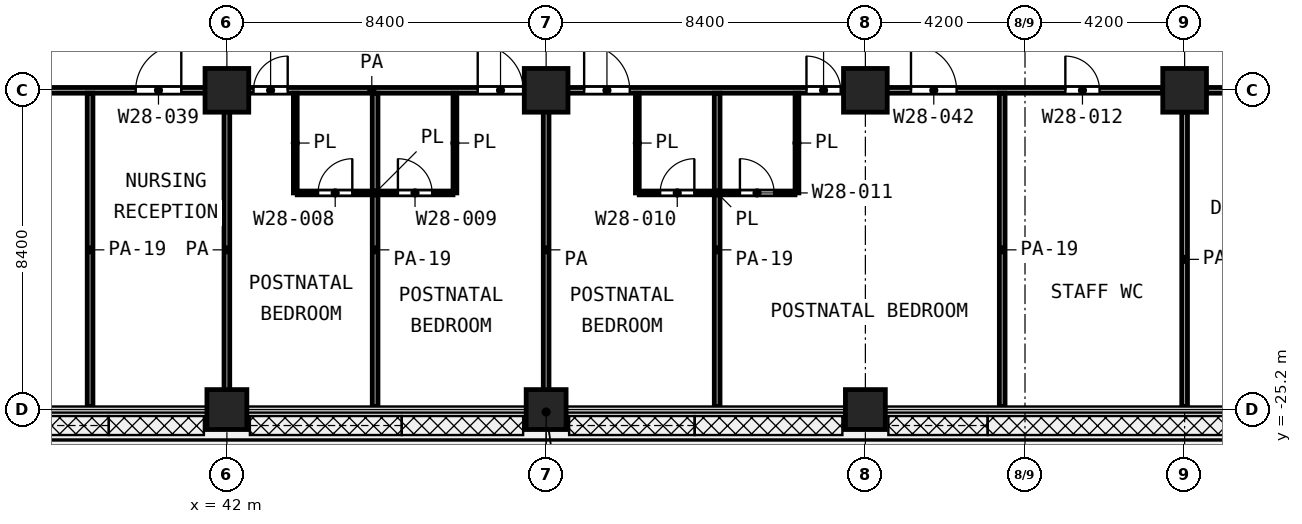
"""IFC4 building model, lengths in metres.
Left out: names, types, materials, properties, quantities, classifications, styles, units other than length and angle.
Written with IfcOpenShell. Run it as: python <this file> out.ifc"""

import sys

from ifc_helpers import new_model, si_unit, direction, frame, frame_2d, origin, origin_2d, place, context, subcontext, project, spatial, rectangle, extrude, element, fill, save


model = new_model("IFC4")
c1 = context("Model", 3, precision=1e-05, world=origin(), true_north=direction((0.0, 1.0)))
c2 = subcontext(c1, "Body", "Model", "MODEL_VIEW")
j1 = project(units=[si_unit("LENGTHUNIT", "METRE"), si_unit("PLANEANGLEUNIT", "RADIAN")], contexts=[c1])
p1 = place(None, origin())
s1 = spatial("IfcSite", under=j1, at=p1, CompositionType="ELEMENT")
p2 = place(p1, origin())
s2 = spatial("IfcBuilding", under=s1, at=p2, CompositionType="ELEMENT")
p3 = place(p2, frame((0.0, 0.0, 124.0)))
s3 = spatial("IfcBuildingStorey", under=s2, at=p3, CompositionType="ELEMENT", Elevation=124.0)
for number, where, z_axis, x_axis in (
    (1, (42.0, -16.8, 0.0), (0.0, 0.0, 1.0), (1.0, 0.0, 0.0)),
    (2, (50.4, -16.8, 0.0), (0.0, 0.0, 1.0), (1.0, 0.0, 0.0)),
    (3, (58.8, -16.8, 0.0), (0.0, 0.0, 1.0), (1.0, 0.0, 0.0)),
    (4, (67.2, -16.8, 0.0), (0.0, 0.0, 1.0), (1.0, 0.0, 0.0)),
):
    element("IfcColumn", number, at=place(p3, frame(where, z_axis=z_axis, x_axis=x_axis)), inside=s3, PredefinedType="COLUMN", context=c2, shape_type="SweptSolid", body=[
        extrude(rectangle(XDim=1.15, YDim=1.15, at=origin_2d()), origin(), (0.0, 0.0, 1.0), 4.2),
    ])
for number, where, z_axis, x_axis in (
    (5, (42.0, -25.2, 0.0), (0.0, 0.0, 1.0), (1.0, 0.0, 0.0)),
    (6, (50.4, -25.2, 0.0), (0.0, 0.0, 1.0), (1.0, 0.0, 0.0)),
    (7, (58.8, -25.2, 0.0), (0.0, 0.0, 1.0), (1.0, 0.0, 0.0)),
):
    element("IfcColumn", number, at=place(p3, frame(where, z_axis=z_axis, x_axis=x_axis)), inside=s3, PredefinedType="COLUMN", context=c2, shape_type="SweptSolid", body=[
        extrude(rectangle(XDim=1.05, YDim=1.05, at=origin_2d()), origin(), (0.0, 0.0, 1.0), 4.2),
    ])
p4 = place(p3, frame((43.85, -19.5, 0.0), z_axis=(0.0, 0.0, 1.0), x_axis=(1.0, 0.0, 0.0)))
e8 = element("IfcWall", 8, at=p4, inside=s3, PredefinedType="PARTITIONING", context=c2, shape_type="SweptSolid", body=[
    extrude(rectangle(XDim=4.1, YDim=0.1, at=frame_2d((2.05, 0.0))), origin(), (0.0, 0.0, 1.0), 3.6),
])
p5 = place(p4, frame((0.55, 0.0, 0.0)))
e9 = element("IfcOpeningElement", 9, at=p5, cuts=e8, PredefinedType="OPENING", context=c2, shape_type="SweptSolid", body=[
    extrude(rectangle(XDim=0.9, YDim=2.1, at=frame_2d((0.45, 1.05))), frame((0.0, 0.06, 0.0), z_axis=(0.0, -1.0, 0.0), x_axis=(1.0, 0.0, 0.0)), (0.0, 0.0, 1.0), 0.12),
])
p6 = place(p4, frame((2.65, 0.0, 0.0)))
e10 = element("IfcOpeningElement", 10, at=p6, cuts=e8, PredefinedType="OPENING", context=c2, shape_type="SweptSolid", body=[
    extrude(rectangle(XDim=0.9, YDim=2.1, at=frame_2d((0.45, 1.05))), frame((0.0, 0.06, 0.0), z_axis=(0.0, -1.0, 0.0), x_axis=(1.0, 0.0, 0.0)), (0.0, 0.0, 1.0), 0.12),
])
p7 = place(p3, frame((52.85, -19.5, 0.0), z_axis=(0.0, 0.0, 1.0), x_axis=(1.0, 0.0, 0.0)))
e11 = element("IfcWall", 11, at=p7, inside=s3, PredefinedType="PARTITIONING", context=c2, shape_type="SweptSolid", body=[
    extrude(rectangle(XDim=4.098, YDim=0.1, at=frame_2d((2.049, 0.0))), origin(), (0.0, 0.0, 1.0), 3.6),
])
p8 = place(p7, frame((0.55, 0.0, 0.0)))
e12 = element("IfcOpeningElement", 12, at=p8, cuts=e11, PredefinedType="OPENING", context=c2, shape_type="SweptSolid", body=[
    extrude(rectangle(XDim=0.9, YDim=2.1, at=frame_2d((0.45, 1.05))), frame((0.0, 0.06, 0.0), z_axis=(0.0, -1.0, 0.0), x_axis=(1.0, 0.0, 0.0)), (0.0, 0.0, 1.0), 0.12),
])
p9 = place(p7, frame((2.649, 0.0, 0.0)))
e13 = element("IfcOpeningElement", 13, at=p9, cuts=e11, PredefinedType="OPENING", context=c2, shape_type="SweptSolid", body=[
    extrude(rectangle(XDim=0.9, YDim=2.1, at=frame_2d((0.45, 1.05))), frame((0.0, 0.06, 0.0), z_axis=(0.0, -1.0, 0.0), x_axis=(1.0, 0.0, 0.0)), (0.0, 0.0, 1.0), 0.12),
])
for number, where, z_axis, x_axis in (
    (14, (43.8, -19.5, 0.0), (0.0, 0.0, 1.0), (0.0, 1.0, 0.0)),
    (15, (48.0, -19.5, 0.0), (0.0, 0.0, 1.0), (0.0, 1.0, 0.0)),
    (16, (52.8, -19.5, 0.0), (0.0, 0.0, 1.0), (0.0, 1.0, 0.0)),
):
    element("IfcWall", number, at=place(p3, frame(where, z_axis=z_axis, x_axis=x_axis)), inside=s3, PredefinedType="PARTITIONING", context=c2, shape_type="SweptSolid", body=[
        extrude(rectangle(XDim=2.625, YDim=0.1, at=frame_2d((1.312, 0.0))), origin(), (0.0, 0.0, 1.0), 3.6),
    ])
p10 = place(p3, frame((57.0, -19.499, 0.0), z_axis=(0.0, 0.0, 1.0), x_axis=(0.0, 1.0, 0.0)))
e17 = element("IfcWall", 17, at=p10, inside=s3, PredefinedType="PARTITIONING", context=c2, shape_type="SweptSolid", body=[
    extrude(rectangle(XDim=2.624, YDim=0.1, at=frame_2d((1.312, 0.0))), origin(), (0.0, 0.0, 1.0), 3.6),
])
p11 = place(p3, frame((25.0, -16.8, 0.0), z_axis=(0.0, 0.0, 1.0), x_axis=(1.0, 0.0, 0.0)))
e18 = element("IfcWall", 18, at=p11, inside=s3, PredefinedType="PARTITIONING", context=c2, shape_type="SweptSolid", body=[
    extrude(rectangle(XDim=41.625, YDim=0.15, at=frame_2d((20.812, 0.0))), origin(), (0.0, 0.0, 1.0), 3.6),
])
p12 = place(p11, frame((1.55, 0.0, 0.0)))
e19 = element("IfcOpeningElement", 19, at=p12, cuts=e18, PredefinedType="OPENING", context=c2, shape_type="SweptSolid", body=[
    extrude(rectangle(XDim=1.5, YDim=2.1, at=frame_2d((0.75, 1.05))), frame((0.0, 0.085, 0.0), z_axis=(0.0, -1.0, 0.0), x_axis=(1.0, 0.0, 0.0)), (0.0, 0.0, 1.0), 0.17),
])
p13 = place(p11, frame((9.2, 0.0, 0.0)))
e20 = element("IfcOpeningElement", 20, at=p13, cuts=e18, PredefinedType="OPENING", context=c2, shape_type="SweptSolid", body=[
    extrude(rectangle(XDim=1.0, YDim=2.1, at=frame_2d((0.5, 1.05))), frame((0.0, 0.085, 0.0), z_axis=(0.0, -1.0, 0.0), x_axis=(1.0, 0.0, 0.0)), (0.0, 0.0, 1.0), 0.17),
])
p14 = place(p11, frame((14.6, 0.0, 0.0)))
e21 = element("IfcOpeningElement", 21, at=p14, cuts=e18, PredefinedType="OPENING", context=c2, shape_type="SweptSolid", body=[
    extrude(rectangle(XDim=1.2, YDim=2.1, at=frame_2d((0.6, 1.05))), frame((0.0, 0.085, 0.0), z_axis=(0.0, -1.0, 0.0), x_axis=(1.0, 0.0, 0.0)), (0.0, 0.0, 1.0), 0.17),
])
p15 = place(p11, frame((17.7, 0.0, 0.0)))
e22 = element("IfcOpeningElement", 22, at=p15, cuts=e18, PredefinedType="OPENING", context=c2, shape_type="SweptSolid", body=[
    extrude(rectangle(XDim=0.9, YDim=2.1, at=frame_2d((0.45, 1.05))), frame((0.0, 0.085, 0.0), z_axis=(0.0, -1.0, 0.0), x_axis=(1.0, 0.0, 0.0)), (0.0, 0.0, 1.0), 0.17),
])
p16 = place(p11, frame((23.6, 0.0, 0.0)))
e23 = element("IfcOpeningElement", 23, at=p16, cuts=e18, PredefinedType="OPENING", context=c2, shape_type="SweptSolid", body=[
    extrude(rectangle(XDim=1.2, YDim=2.1, at=frame_2d((0.6, 1.05))), frame((0.0, 0.085, 0.0), z_axis=(0.0, -1.0, 0.0), x_axis=(1.0, 0.0, 0.0)), (0.0, 0.0, 1.0), 0.17),
])
p17 = place(p11, frame((26.4, 0.0, 0.0)))
e24 = element("IfcOpeningElement", 24, at=p17, cuts=e18, PredefinedType="OPENING", context=c2, shape_type="SweptSolid", body=[
    extrude(rectangle(XDim=1.2, YDim=2.1, at=frame_2d((0.6, 1.05))), frame((0.0, 0.085, 0.0), z_axis=(0.0, -1.0, 0.0), x_axis=(1.0, 0.0, 0.0)), (0.0, 0.0, 1.0), 0.17),
])
p18 = place(p11, frame((35.0, 0.0, 0.0)))
e25 = element("IfcOpeningElement", 25, at=p18, cuts=e18, PredefinedType="OPENING", context=c2, shape_type="SweptSolid", body=[
    extrude(rectangle(XDim=1.2, YDim=2.1, at=frame_2d((0.6, 1.05))), frame((0.0, 0.085, 0.0), z_axis=(0.0, -1.0, 0.0), x_axis=(1.0, 0.0, 0.0)), (0.0, 0.0, 1.0), 0.17),
])
p19 = place(p11, frame((32.25, 0.0, 0.0)))
e26 = element("IfcOpeningElement", 26, at=p19, cuts=e18, PredefinedType="OPENING", context=c2, shape_type="SweptSolid", body=[
    extrude(rectangle(XDim=0.9, YDim=2.1, at=frame_2d((0.45, 1.05))), frame((0.0, 0.085, 0.0), z_axis=(0.0, -1.0, 0.0), x_axis=(1.0, 0.0, 0.0)), (0.0, 0.0, 1.0), 0.17),
])
p20 = place(p11, frame((39.062, 0.0, 0.0)))
e27 = element("IfcOpeningElement", 27, at=p20, cuts=e18, PredefinedType="OPENING", context=c2, shape_type="SweptSolid", body=[
    extrude(rectangle(XDim=0.9, YDim=2.1, at=frame_2d((0.45, 1.05))), frame((0.0, 0.085, 0.0), z_axis=(0.0, -1.0, 0.0), x_axis=(1.0, 0.0, 0.0)), (0.0, 0.0, 1.0), 0.17),
])
p21 = place(p3, frame((67.775, -16.8, 0.0), z_axis=(0.0, 0.0, 1.0), x_axis=(1.0, 0.0, 0.0)))
e28 = element("IfcWall", 28, at=p21, inside=s3, PredefinedType="PARTITIONING", context=c2, shape_type="SweptSolid", body=[
    extrude(rectangle(XDim=7.745, YDim=0.15, at=frame_2d((3.873, 0.0))), origin(), (0.0, 0.0, 1.0), 3.6),
])
p22 = place(p21, frame((3.162, 0.0, 0.0)))
e29 = element("IfcOpeningElement", 29, at=p22, cuts=e28, PredefinedType="OPENING", context=c2, shape_type="SweptSolid", body=[
    extrude(rectangle(XDim=1.5, YDim=2.1, at=frame_2d((0.75, 1.05))), frame((0.0, 0.085, 0.0), z_axis=(0.0, -1.0, 0.0), x_axis=(1.0, 0.0, 0.0)), (0.0, 0.0, 1.0), 0.17),
])
p23 = place(p3, frame((38.4, -25.12, 0.0), z_axis=(0.0, 0.0, 1.0), x_axis=(0.0, 1.0, 0.0)))
e30 = element("IfcWall", 30, at=p23, inside=s3, PredefinedType="PARTITIONING", context=c2, shape_type="SweptSolid", body=[
    extrude(rectangle(XDim=8.245, YDim=0.15, at=frame_2d((4.123, 0.0))), origin(), (0.0, 0.0, 1.0), 2.7),
])
p24 = place(p3, frame((42.0, -25.12, 0.0), z_axis=(0.0, 0.0, 1.0), x_axis=(0.0, 1.0, 0.0)))
e31 = element("IfcWall", 31, at=p24, inside=s3, PredefinedType="PARTITIONING", context=c2, shape_type="SweptSolid", body=[
    extrude(rectangle(XDim=8.245, YDim=0.15, at=frame_2d((4.123, 0.0))), origin(), (0.0, 0.0, 1.0), 3.6),
])
p25 = place(p3, frame((45.9, -25.12, 0.0), z_axis=(0.0, 0.0, 1.0), x_axis=(0.0, 1.0, 0.0)))
e32 = element("IfcWall", 32, at=p25, inside=s3, PredefinedType="PARTITIONING", context=c2, shape_type="SweptSolid", body=[
    extrude(rectangle(XDim=8.245, YDim=0.15, at=frame_2d((4.123, 0.0))), origin(), (0.0, 0.0, 1.0), 2.7),
])
p26 = place(p3, frame((50.4, -25.12, 0.0), z_axis=(0.0, 0.0, 1.0), x_axis=(0.0, 1.0, 0.0)))
e33 = element("IfcWall", 33, at=p26, inside=s3, PredefinedType="PARTITIONING", context=c2, shape_type="SweptSolid", body=[
    extrude(rectangle(XDim=8.245, YDim=0.15, at=frame_2d((4.123, 0.0))), origin(), (0.0, 0.0, 1.0), 3.6),
])
for number, where, z_axis, x_axis in (
    (34, (54.9, -25.12, 0.0), (0.0, 0.0, 1.0), (0.0, 1.0, 0.0)),
    (35, (62.4, -25.12, 0.0), (0.0, 0.0, 1.0), (0.0, 1.0, 0.0)),
):
    element("IfcWall", number, at=place(p3, frame(where, z_axis=z_axis, x_axis=x_axis)), inside=s3, PredefinedType="PARTITIONING", context=c2, shape_type="SweptSolid", body=[
        extrude(rectangle(XDim=8.245, YDim=0.15, at=frame_2d((4.123, 0.0))), origin(), (0.0, 0.0, 1.0), 2.7),
    ])
p27 = place(p3, frame((67.2, -25.12, 0.0), z_axis=(0.0, 0.0, 1.0), x_axis=(0.0, 1.0, 0.0)))
e36 = element("IfcWall", 36, at=p27, inside=s3, PredefinedType="PARTITIONING", context=c2, shape_type="SweptSolid", body=[
    extrude(rectangle(XDim=7.745, YDim=0.15, at=frame_2d((3.873, 0.0))), origin(), (0.0, 0.0, 1.0), 2.7),
])
p28 = place(p14, origin())
e37 = element("IfcDoor", 37, at=p28, inside=s3, OperationType="SINGLE_SWING_RIGHT", PredefinedType="DOOR", context=c2, shape_type="SweptSolid", body=[
    extrude(rectangle(XDim=1.2, YDim=2.1, at=frame_2d((0.6, 1.05))), frame((0.0, 0.025, 0.0), z_axis=(0.0, -1.0, 0.0), x_axis=(1.0, 0.0, 0.0)), (0.0, 0.0, 1.0), 0.05),
])
fill(e21, e37)
p29 = place(p15, origin())
e38 = element("IfcDoor", 38, at=p29, inside=s3, OperationType="SINGLE_SWING_RIGHT", PredefinedType="DOOR", context=c2, shape_type="SweptSolid", body=[
    extrude(rectangle(XDim=0.9, YDim=2.1, at=frame_2d((0.45, 1.05))), frame((0.0, 0.025, 0.0), z_axis=(0.0, -1.0, 0.0), x_axis=(1.0, 0.0, 0.0)), (0.0, 0.0, 1.0), 0.05),
])
fill(e22, e38)
p30 = place(p5, origin())
e39 = element("IfcDoor", 39, at=p30, inside=s3, OperationType="SINGLE_SWING_RIGHT", PredefinedType="DOOR", context=c2, shape_type="SweptSolid", body=[
    extrude(rectangle(XDim=0.9, YDim=2.1, at=frame_2d((0.45, 1.05))), frame((0.0, 0.025, 0.0), z_axis=(0.0, -1.0, 0.0), x_axis=(1.0, 0.0, 0.0)), (0.0, 0.0, 1.0), 0.05),
])
fill(e9, e39)
p31 = place(p16, origin())
e40 = element("IfcDoor", 40, at=p31, inside=s3, OperationType="SINGLE_SWING_LEFT", PredefinedType="DOOR", context=c2, shape_type="SweptSolid", body=[
    extrude(rectangle(XDim=1.2, YDim=2.1, at=frame_2d((0.6, 1.05))), frame((0.0, 0.025, 0.0), z_axis=(0.0, -1.0, 0.0), x_axis=(1.0, 0.0, 0.0)), (0.0, 0.0, 1.0), 0.05),
])
fill(e23, e40)
p32 = place(p6, origin())
e41 = element("IfcDoor", 41, at=p32, inside=s3, OperationType="SINGLE_SWING_LEFT", PredefinedType="DOOR", context=c2, shape_type="SweptSolid", body=[
    extrude(rectangle(XDim=0.9, YDim=2.1, at=frame_2d((0.45, 1.05))), frame((0.0, 0.025, 0.0), z_axis=(0.0, -1.0, 0.0), x_axis=(1.0, 0.0, 0.0)), (0.0, 0.0, 1.0), 0.05),
])
fill(e10, e41)
p33 = place(p17, origin())
e42 = element("IfcDoor", 42, at=p33, inside=s3, OperationType="SINGLE_SWING_LEFT", PredefinedType="DOOR", context=c2, shape_type="SweptSolid", body=[
    extrude(rectangle(XDim=1.2, YDim=2.1, at=frame_2d((0.6, 1.05))), frame((0.0, 0.025, 0.0), z_axis=(0.0, -1.0, 0.0), x_axis=(1.0, 0.0, 0.0)), (0.0, 0.0, 1.0), 0.05),
])
fill(e24, e42)
p34 = place(p8, origin())
e43 = element("IfcDoor", 43, at=p34, inside=s3, OperationType="SINGLE_SWING_RIGHT", PredefinedType="DOOR", context=c2, shape_type="SweptSolid", body=[
    extrude(rectangle(XDim=0.9, YDim=2.1, at=frame_2d((0.45, 1.05))), frame((0.0, 0.025, 0.0), z_axis=(0.0, -1.0, 0.0), x_axis=(1.0, 0.0, 0.0)), (0.0, 0.0, 1.0), 0.05),
])
fill(e12, e43)
p35 = place(p18, origin())
e44 = element("IfcDoor", 44, at=p35, inside=s3, OperationType="SINGLE_SWING_LEFT", PredefinedType="DOOR", context=c2, shape_type="SweptSolid", body=[
    extrude(rectangle(XDim=1.2, YDim=2.1, at=frame_2d((0.6, 1.05))), frame((0.0, 0.025, 0.0), z_axis=(0.0, -1.0, 0.0), x_axis=(1.0, 0.0, 0.0)), (0.0, 0.0, 1.0), 0.05),
])
fill(e25, e44)
p36 = place(p19, origin())
e45 = element("IfcDoor", 45, at=p36, inside=s3, OperationType="SINGLE_SWING_LEFT", PredefinedType="DOOR", context=c2, shape_type="SweptSolid", body=[
    extrude(rectangle(XDim=0.9, YDim=2.1, at=frame_2d((0.45, 1.05))), frame((0.0, 0.025, 0.0), z_axis=(0.0, -1.0, 0.0), x_axis=(1.0, 0.0, 0.0)), (0.0, 0.0, 1.0), 0.05),
])
fill(e26, e45)
p37 = place(p9, origin())
e46 = element("IfcDoor", 46, at=p37, inside=s3, OperationType="SINGLE_SWING_LEFT", PredefinedType="DOOR", context=c2, shape_type="SweptSolid", body=[
    extrude(rectangle(XDim=0.9, YDim=2.1, at=frame_2d((0.45, 1.05))), frame((0.0, 0.025, 0.0), z_axis=(0.0, -1.0, 0.0), x_axis=(1.0, 0.0, 0.0)), (0.0, 0.0, 1.0), 0.05),
])
fill(e13, e46)
p38 = place(p20, origin())
e47 = element("IfcDoor", 47, at=p38, inside=s3, OperationType="SINGLE_SWING_LEFT", PredefinedType="DOOR", context=c2, shape_type="SweptSolid", body=[
    extrude(rectangle(XDim=0.9, YDim=2.1, at=frame_2d((0.45, 1.05))), frame((0.0, 0.025, 0.0), z_axis=(0.0, -1.0, 0.0), x_axis=(1.0, 0.0, 0.0)), (0.0, 0.0, 1.0), 0.05),
])
fill(e27, e47)
save(model, sys.argv[1])
